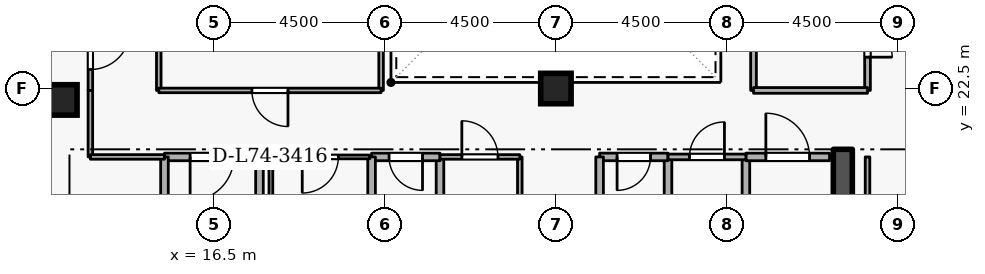
"""IFC4 building model, lengths in metres.
Left out: names, types, materials, properties, quantities, classifications, styles, units other than length and angle.
Written with IfcOpenShell. Run it as: python <this file> out.ifc"""

import sys

from ifc_helpers import new_model, si_unit, direction, frame, frame_2d, origin, origin_2d, place, context, subcontext, project, spatial, rectangle, extrude, element, fill, save


model = new_model("IFC4")
c1 = context("Model", 3, precision=1e-05, world=origin(), true_north=direction((0.0, 1.0)))
c2 = subcontext(c1, "Body", "Model", "MODEL_VIEW")
j1 = project(units=[si_unit("LENGTHUNIT", "METRE"), si_unit("PLANEANGLEUNIT", "RADIAN")], contexts=[c1])
p1 = place(None, origin())
s1 = spatial("IfcSite", under=j1, at=p1, CompositionType="ELEMENT")
p2 = place(p1, origin())
s2 = spatial("IfcBuilding", under=s1, at=p2, CompositionType="ELEMENT")
p3 = place(p2, frame((0.0, 0.0, 276.3)))
s3 = spatial("IfcBuildingStorey", under=s2, at=p3, CompositionType="ELEMENT", Elevation=276.3)
p4 = place(p3, frame((33.05, 15.1, 0.0), z_axis=(0.0, 0.0, 1.0), x_axis=(0.0, 1.0, 0.0)))
e1 = element("IfcWall", 1, at=p4, inside=s3, PredefinedType="SHEAR", context=c2, shape_type="SweptSolid", body=[
    extrude(rectangle(XDim=5.8, YDim=0.5, at=frame_2d((2.9, 0.0))), origin(), (0.0, 0.0, 1.0), 3.6),
])
for number, where, z_axis, x_axis in (
    (2, (12.5, 22.2, 0.0), (0.0, 0.0, 1.0), (1.0, 0.0, 0.0)),
    (3, (25.5, 22.5, 0.0), (0.0, 0.0, 1.0), (1.0, 0.0, 0.0)),
):
    element("IfcColumn", number, at=place(p3, frame(where, z_axis=z_axis, x_axis=x_axis)), inside=s3, PredefinedType="COLUMN", context=c2, shape_type="SweptSolid", body=[
        extrude(rectangle(XDim=0.8, YDim=0.8, at=origin_2d()), origin(), (0.0, 0.0, 1.0), 3.6),
    ])
p5 = place(p3, frame((17.7, 18.4, 0.0), z_axis=(0.0, 0.0, 1.0), x_axis=(0.0, 1.0, 0.0)))
e4 = element("IfcWall", 4, at=p5, inside=s3, PredefinedType="STANDARD", context=c2, shape_type="SweptSolid", body=[
    extrude(rectangle(XDim=2.3, YDim=0.2, at=frame_2d((1.15, 0.0))), origin(), (0.0, 0.0, 1.0), 2.465),
])
p6 = place(p3, frame((17.7, 20.7, 0.0), z_axis=(0.0, 0.0, 1.0), x_axis=(-1.0, 0.0, 0.0)))
e5 = element("IfcWall", 5, at=p6, inside=s3, PredefinedType="STANDARD", context=c2, shape_type="SweptSolid", body=[
    extrude(rectangle(XDim=2.5, YDim=0.2, at=frame_2d((1.25, 0.0))), origin(), (0.0, 0.0, 1.0), 3.26),
])
p7 = place(p6, frame((0.675, 0.0, 0.0)))
e6 = element("IfcOpeningElement", 6, at=p7, cuts=e5, PredefinedType="OPENING", context=c2, shape_type="SweptSolid", body=[
    extrude(rectangle(XDim=1.15, YDim=2.1, at=frame_2d((0.575, 1.05))), frame((0.0, 0.11, 0.0), z_axis=(0.0, -1.0, 0.0), x_axis=(1.0, 0.0, 0.0)), (0.0, 0.0, 1.0), 0.22),
])
p8 = place(p3, frame((15.2, 20.7, 0.0), z_axis=(0.0, 0.0, 1.0), x_axis=(0.0, -1.0, 0.0)))
e7 = element("IfcWall", 7, at=p8, inside=s3, PredefinedType="STANDARD", context=c2, shape_type="SweptSolid", body=[
    extrude(rectangle(XDim=5.7, YDim=0.2, at=frame_2d((2.85, 0.0))), origin(), (0.0, 0.0, 1.0), 3.26),
])
p9 = place(p3, frame((28.45, 18.65, 0.0), z_axis=(0.0, 0.0, 1.0), x_axis=(0.0, 1.0, 0.0)))
e8 = element("IfcWall", 8, at=p9, inside=s3, PredefinedType="STANDARD", context=c2, shape_type="SweptSolid", body=[
    extrude(rectangle(XDim=2.05, YDim=0.2, at=frame_2d((1.025, 0.0))), origin(), (0.0, 0.0, 1.0), 3.26),
])
p10 = place(p3, frame((28.45, 20.7, 0.0), z_axis=(0.0, 0.0, 1.0), x_axis=(-1.0, 0.0, 0.0)))
e9 = element("IfcWall", 9, at=p10, inside=s3, PredefinedType="STANDARD", context=c2, shape_type="SweptSolid", body=[
    extrude(rectangle(XDim=1.8, YDim=0.2, at=frame_2d((0.9, 0.0))), origin(), (0.0, 0.0, 1.0), 3.26),
])
p11 = place(p10, frame((0.46, 0.0, 0.0)))
e10 = element("IfcOpeningElement", 10, at=p11, cuts=e9, PredefinedType="OPENING", context=c2, shape_type="SweptSolid", body=[
    extrude(rectangle(XDim=0.88, YDim=2.04, at=frame_2d((0.44, 1.02))), frame((0.0, 0.11, 0.0), z_axis=(0.0, -1.0, 0.0), x_axis=(1.0, 0.0, 0.0)), (0.0, 0.0, 1.0), 0.22),
])
for number, where, z_axis, x_axis in (
    (11, (26.65, 20.7, 0.0), (0.0, 0.0, 1.0), (0.0, -1.0, 0.0)),
    (12, (22.45, 18.65, 0.0), (0.0, 0.0, 1.0), (0.0, 1.0, 0.0)),
):
    element("IfcWall", number, at=place(p3, frame(where, z_axis=z_axis, x_axis=x_axis)), inside=s3, PredefinedType="STANDARD", context=c2, shape_type="SweptSolid", body=[
        extrude(rectangle(XDim=2.05, YDim=0.2, at=frame_2d((1.025, 0.0))), origin(), (0.0, 0.0, 1.0), 3.26),
    ])
p12 = place(p3, frame((22.45, 20.7, 0.0), z_axis=(0.0, 0.0, 1.0), x_axis=(-1.0, 0.0, 0.0)))
e13 = element("IfcWall", 13, at=p12, inside=s3, PredefinedType="STANDARD", context=c2, shape_type="SweptSolid", body=[
    extrude(rectangle(XDim=1.8, YDim=0.2, at=frame_2d((0.9, 0.0))), origin(), (0.0, 0.0, 1.0), 3.26),
])
p13 = place(p12, frame((0.46, 0.0, 0.0)))
e14 = element("IfcOpeningElement", 14, at=p13, cuts=e13, PredefinedType="OPENING", context=c2, shape_type="SweptSolid", body=[
    extrude(rectangle(XDim=0.88, YDim=2.04, at=frame_2d((0.44, 1.02))), frame((0.0, 0.11, 0.0), z_axis=(0.0, -1.0, 0.0), x_axis=(1.0, 0.0, 0.0)), (0.0, 0.0, 1.0), 0.22),
])
for number, where, z_axis, x_axis in (
    (15, (20.65, 20.7, 0.0), (0.0, 0.0, 1.0), (0.0, -1.0, 0.0)),
    (16, (30.5, 18.65, 0.0), (0.0, 0.0, 1.0), (0.0, 1.0, 0.0)),
):
    element("IfcWall", number, at=place(p3, frame(where, z_axis=z_axis, x_axis=x_axis)), inside=s3, PredefinedType="STANDARD", context=c2, shape_type="SweptSolid", body=[
        extrude(rectangle(XDim=2.05, YDim=0.2, at=frame_2d((1.025, 0.0))), origin(), (0.0, 0.0, 1.0), 3.26),
    ])
p14 = place(p3, frame((30.5, 20.7, 0.0), z_axis=(0.0, 0.0, 1.0), x_axis=(1.0, 0.0, 0.0)))
e17 = element("IfcWall", 17, at=p14, inside=s3, PredefinedType="STANDARD", context=c2, shape_type="SweptSolid", body=[
    extrude(rectangle(XDim=2.2, YDim=0.2, at=frame_2d((1.1, 0.0))), origin(), (0.0, 0.0, 1.0), 3.26),
])
p15 = place(p14, frame((0.525, 0.0, 0.0)))
e18 = element("IfcOpeningElement", 18, at=p15, cuts=e17, PredefinedType="OPENING", context=c2, shape_type="SweptSolid", body=[
    extrude(rectangle(XDim=1.15, YDim=2.1, at=frame_2d((0.575, 1.05))), frame((0.0, 0.11, 0.0), z_axis=(0.0, -1.0, 0.0), x_axis=(1.0, 0.0, 0.0)), (0.0, 0.0, 1.0), 0.22),
])
p16 = place(p3, frame((20.6, 20.7, 0.0), z_axis=(0.0, 0.0, 1.0), x_axis=(-1.0, 0.0, 0.0)))
e19 = element("IfcWall", 19, at=p16, inside=s3, PredefinedType="PARTITIONING", context=c2, shape_type="SweptSolid", body=[
    extrude(rectangle(XDim=2.6, YDim=0.1, at=frame_2d((1.3, 0.0))), origin(), (0.0, 0.0, 1.0), 3.26),
])
p17 = place(p16, frame((0.825, 0.0, 0.0)))
e20 = element("IfcOpeningElement", 20, at=p17, cuts=e19, PredefinedType="OPENING", context=c2, shape_type="SweptSolid", body=[
    extrude(rectangle(XDim=0.95, YDim=2.1, at=frame_2d((0.475, 1.05))), frame((0.0, 0.06, 0.0), z_axis=(0.0, -1.0, 0.0), x_axis=(1.0, 0.0, 0.0)), (0.0, 0.0, 1.0), 0.12),
])
p18 = place(p3, frame((18.0, 20.7, 0.0), z_axis=(0.0, 0.0, 1.0), x_axis=(0.0, -1.0, 0.0)))
e21 = element("IfcWall", 21, at=p18, inside=s3, PredefinedType="PARTITIONING", context=c2, shape_type="SweptSolid", body=[
    extrude(rectangle(XDim=2.05, YDim=0.1, at=frame_2d((1.025, 0.0))), origin(), (0.0, 0.0, 1.0), 2.465),
])
p19 = place(p3, frame((24.55, 20.7, 0.0), z_axis=(0.0, 0.0, 1.0), x_axis=(0.0, -1.0, 0.0)))
e22 = element("IfcWall", 22, at=p19, inside=s3, PredefinedType="PARTITIONING", context=c2, shape_type="SweptSolid", body=[
    extrude(rectangle(XDim=2.05, YDim=0.12, at=frame_2d((1.025, 0.0))), origin(), (0.0, 0.0, 1.0), 3.26),
])
p20 = place(p3, frame((22.45, 20.7, 0.0), z_axis=(0.0, 0.0, 1.0), x_axis=(1.0, 0.0, 0.0)))
e23 = element("IfcWall", 23, at=p20, inside=s3, PredefinedType="PARTITIONING", context=c2, shape_type="SweptSolid", body=[
    extrude(rectangle(XDim=2.1, YDim=0.12, at=frame_2d((1.05, 0.0))), origin(), (0.0, 0.0, 1.0), 3.26),
])
p21 = place(p20, frame((0.575, 0.0, 0.0)))
e24 = element("IfcOpeningElement", 24, at=p21, cuts=e23, PredefinedType="OPENING", context=c2, shape_type="SweptSolid", body=[
    extrude(rectangle(XDim=0.95, YDim=2.1, at=frame_2d((0.475, 1.05))), frame((0.0, 0.07, 0.0), z_axis=(0.0, -1.0, 0.0), x_axis=(1.0, 0.0, 0.0)), (0.0, 0.0, 1.0), 0.14),
])
p22 = place(p3, frame((28.45, 20.7, 0.0), z_axis=(0.0, 0.0, 1.0), x_axis=(1.0, 0.0, 0.0)))
e25 = element("IfcWall", 25, at=p22, inside=s3, PredefinedType="PARTITIONING", context=c2, shape_type="SweptSolid", body=[
    extrude(rectangle(XDim=2.05, YDim=0.15, at=frame_2d((1.025, 0.0))), origin(), (0.0, 0.0, 1.0), 3.26),
])
p23 = place(p22, frame((0.565, 0.0, 0.0)))
e26 = element("IfcOpeningElement", 26, at=p23, cuts=e25, PredefinedType="OPENING", context=c2, shape_type="SweptSolid", body=[
    extrude(rectangle(XDim=0.92, YDim=2.08, at=frame_2d((0.46, 1.04))), frame((0.0, 0.085, 0.0), z_axis=(0.0, -1.0, 0.0), x_axis=(1.0, 0.0, 0.0)), (0.0, 0.0, 1.0), 0.17),
])
p24 = place(p3, frame((33.7, 20.7, 0.0), z_axis=(0.0, 0.0, 1.0), x_axis=(0.0, -1.0, 0.0)))
e27 = element("IfcWall", 27, at=p24, inside=s3, PredefinedType="PARTITIONING", context=c2, shape_type="SweptSolid", body=[
    extrude(rectangle(XDim=5.9, YDim=0.12, at=frame_2d((2.95, 0.0))), origin(), (0.0, 0.0, 1.0), 3.26),
])
p25 = place(p3, frame((13.25, 24.6, 0.0), z_axis=(0.0, 0.0, 1.0), x_axis=(0.0, -1.0, 0.0)))
e28 = element("IfcWall", 28, at=p25, inside=s3, PredefinedType="PARTITIONING", context=c2, shape_type="SweptSolid", body=[
    extrude(rectangle(XDim=2.15, YDim=0.12, at=frame_2d((1.075, 0.0))), origin(), (0.0, 0.0, 1.0), 3.26),
])
p26 = place(p25, frame((0.55, 0.0, 0.0)))
e29 = element("IfcOpeningElement", 29, at=p26, cuts=e28, PredefinedType="OPENING", context=c2, shape_type="SweptSolid", body=[
    extrude(rectangle(XDim=1.05, YDim=2.1, at=frame_2d((0.525, 1.05))), frame((0.0, 0.07, 0.0), z_axis=(0.0, -1.0, 0.0), x_axis=(1.0, 0.0, 0.0)), (0.0, 0.0, 1.0), 0.14),
])
p27 = place(p3, frame((13.25, 22.45, 0.0), z_axis=(0.0, 0.0, 1.0), x_axis=(0.0, -1.0, 0.0)))
e30 = element("IfcWall", 30, at=p27, inside=s3, PredefinedType="PARTITIONING", context=c2, shape_type="SweptSolid", body=[
    extrude(rectangle(XDim=1.75, YDim=0.12, at=frame_2d((0.875, 0.0))), origin(), (0.0, 0.0, 1.0), 3.26),
])
p28 = place(p3, frame((13.25, 20.7, 0.0), z_axis=(0.0, 0.0, 1.0), x_axis=(1.0, 0.0, 0.0)))
e31 = element("IfcWall", 31, at=p28, inside=s3, PredefinedType="PARTITIONING", context=c2, shape_type="SweptSolid", body=[
    extrude(rectangle(XDim=1.95, YDim=0.12, at=frame_2d((0.975, 0.0))), origin(), (0.0, 0.0, 1.0), 3.26),
])
for number, where, z_axis, x_axis in (
    (32, (15.05, 22.45, 0.0), (0.0, 0.0, 1.0), (0.0, 1.0, 0.0)),
    (33, (20.9, 26.2, 0.0), (0.0, 0.0, 1.0), (0.0, -1.0, 0.0)),
):
    element("IfcWall", number, at=place(p3, frame(where, z_axis=z_axis, x_axis=x_axis)), inside=s3, PredefinedType="PARTITIONING", context=c2, shape_type="SweptSolid", body=[
        extrude(rectangle(XDim=3.75, YDim=0.12, at=frame_2d((1.875, 0.0))), origin(), (0.0, 0.0, 1.0), 3.26),
    ])
p29 = place(p3, frame((20.9, 22.45, 0.0), z_axis=(0.0, 0.0, 1.0), x_axis=(-1.0, 0.0, 0.0)))
e34 = element("IfcWall", 34, at=p29, inside=s3, PredefinedType="PARTITIONING", context=c2, shape_type="SweptSolid", body=[
    extrude(rectangle(XDim=5.85, YDim=0.12, at=frame_2d((2.925, 0.0))), origin(), (0.0, 0.0, 1.0), 3.26),
])
p30 = place(p29, frame((2.45, 0.0, 0.0)))
e35 = element("IfcOpeningElement", 35, at=p30, cuts=e34, PredefinedType="OPENING", context=c2, shape_type="SweptSolid", body=[
    extrude(rectangle(XDim=0.95, YDim=2.1, at=frame_2d((0.475, 1.05))), frame((0.0, 0.07, 0.0), z_axis=(0.0, -1.0, 0.0), x_axis=(1.0, 0.0, 0.0)), (0.0, 0.0, 1.0), 0.14),
])
p31 = place(p3, frame((30.7, 22.45, 0.0), z_axis=(0.0, 0.0, 1.0), x_axis=(0.0, 1.0, 0.0)))
e36 = element("IfcWall", 36, at=p31, inside=s3, PredefinedType="PARTITIONING", context=c2, shape_type="SweptSolid", body=[
    extrude(rectangle(XDim=3.05, YDim=0.15, at=frame_2d((1.525, 0.0))), origin(), (0.0, 0.0, 1.0), 3.26),
])
p32 = place(p3, frame((33.7, 25.5, 0.0), z_axis=(0.0, 0.0, 1.0), x_axis=(0.0, -1.0, 0.0)))
e37 = element("IfcWall", 37, at=p32, inside=s3, PredefinedType="PARTITIONING", context=c2, shape_type="SweptSolid", body=[
    extrude(rectangle(XDim=3.05, YDim=0.15, at=frame_2d((1.525, 0.0))), origin(), (0.0, 0.0, 1.0), 3.26),
])
p33 = place(p32, frame((0.875, 0.0, 0.0)))
e38 = element("IfcOpeningElement", 38, at=p33, cuts=e37, PredefinedType="OPENING", context=c2, shape_type="SweptSolid", body=[
    extrude(rectangle(XDim=1.3, YDim=2.12, at=frame_2d((0.65, 1.06))), frame((0.0, 0.085, 0.0), z_axis=(0.0, -1.0, 0.0), x_axis=(1.0, 0.0, 0.0)), (0.0, 0.0, 1.0), 0.17),
])
p34 = place(p3, frame((33.7, 22.45, 0.0), z_axis=(0.0, 0.0, 1.0), x_axis=(-1.0, 0.0, 0.0)))
e39 = element("IfcWall", 39, at=p34, inside=s3, PredefinedType="PARTITIONING", context=c2, shape_type="SweptSolid", body=[
    extrude(rectangle(XDim=3.0, YDim=0.15, at=frame_2d((1.5, 0.0))), origin(), (0.0, 0.0, 1.0), 3.26),
])
p35 = place(p7, origin())
e40 = element("IfcDoor", 40, at=p35, inside=s3, OperationType="SINGLE_SWING_RIGHT", PredefinedType="DOOR", context=c2, shape_type="SweptSolid", body=[
    extrude(rectangle(XDim=1.15, YDim=2.1, at=frame_2d((0.575, 1.05))), frame((0.0, 0.025, 0.0), z_axis=(0.0, -1.0, 0.0), x_axis=(1.0, 0.0, 0.0)), (0.0, 0.0, 1.0), 0.05),
])
fill(e6, e40)
p36 = place(p11, origin())
e41 = element("IfcDoor", 41, at=p36, inside=s3, OperationType="SINGLE_SWING_RIGHT", PredefinedType="DOOR", context=c2, shape_type="SweptSolid", body=[
    extrude(rectangle(XDim=0.88, YDim=2.04, at=frame_2d((0.44, 1.02))), frame((0.0, 0.025, 0.0), z_axis=(0.0, -1.0, 0.0), x_axis=(1.0, 0.0, 0.0)), (0.0, 0.0, 1.0), 0.05),
])
fill(e10, e41)
p37 = place(p13, origin())
e42 = element("IfcDoor", 42, at=p37, inside=s3, OperationType="SINGLE_SWING_LEFT", PredefinedType="DOOR", context=c2, shape_type="SweptSolid", body=[
    extrude(rectangle(XDim=0.88, YDim=2.04, at=frame_2d((0.44, 1.02))), frame((0.0, 0.025, 0.0), z_axis=(0.0, -1.0, 0.0), x_axis=(1.0, 0.0, 0.0)), (0.0, 0.0, 1.0), 0.05),
])
fill(e14, e42)
p38 = place(p17, origin())
e43 = element("IfcDoor", 43, at=p38, inside=s3, OperationType="SINGLE_SWING_RIGHT", PredefinedType="DOOR", context=c2, shape_type="SweptSolid", body=[
    extrude(rectangle(XDim=0.95, YDim=2.1, at=frame_2d((0.475, 1.05))), frame((0.0, 0.025, 0.0), z_axis=(0.0, -1.0, 0.0), x_axis=(1.0, 0.0, 0.0)), (0.0, 0.0, 1.0), 0.05),
])
fill(e20, e43)
p39 = place(p21, origin())
e44 = element("IfcDoor", 44, at=p39, inside=s3, OperationType="SINGLE_SWING_LEFT", PredefinedType="DOOR", context=c2, shape_type="SweptSolid", body=[
    extrude(rectangle(XDim=0.95, YDim=2.1, at=frame_2d((0.475, 1.05))), frame((0.0, 0.025, 0.0), z_axis=(0.0, -1.0, 0.0), x_axis=(1.0, 0.0, 0.0)), (0.0, 0.0, 1.0), 0.05),
])
fill(e24, e44)
p40 = place(p23, origin())
e45 = element("IfcDoor", 45, at=p40, inside=s3, OperationType="SINGLE_SWING_RIGHT", PredefinedType="DOOR", context=c2, shape_type="SweptSolid", body=[
    extrude(rectangle(XDim=0.92, YDim=2.08, at=frame_2d((0.46, 1.04))), frame((0.0, 0.025, 0.0), z_axis=(0.0, -1.0, 0.0), x_axis=(1.0, 0.0, 0.0)), (0.0, 0.0, 1.0), 0.05),
])
fill(e26, e45)
p41 = place(p15, origin())
e46 = element("IfcDoor", 46, at=p41, inside=s3, OperationType="SINGLE_SWING_LEFT", PredefinedType="DOOR", context=c2, shape_type="SweptSolid", body=[
    extrude(rectangle(XDim=1.15, YDim=2.1, at=frame_2d((0.575, 1.05))), frame((0.0, 0.025, 0.0), z_axis=(0.0, -1.0, 0.0), x_axis=(1.0, 0.0, 0.0)), (0.0, 0.0, 1.0), 0.05),
])
fill(e18, e46)
p42 = place(p26, origin())
e47 = element("IfcDoor", 47, at=p42, inside=s3, OperationType="SINGLE_SWING_LEFT", PredefinedType="DOOR", context=c2, shape_type="SweptSolid", body=[
    extrude(rectangle(XDim=1.05, YDim=2.1, at=frame_2d((0.525, 1.05))), frame((0.0, 0.025, 0.0), z_axis=(0.0, -1.0, 0.0), x_axis=(1.0, 0.0, 0.0)), (0.0, 0.0, 1.0), 0.05),
])
fill(e29, e47)
p43 = place(p30, origin())
e48 = element("IfcDoor", 48, at=p43, inside=s3, OperationType="SINGLE_SWING_LEFT", PredefinedType="DOOR", context=c2, shape_type="SweptSolid", body=[
    extrude(rectangle(XDim=0.95, YDim=2.1, at=frame_2d((0.475, 1.05))), frame((0.0, 0.025, 0.0), z_axis=(0.0, -1.0, 0.0), x_axis=(1.0, 0.0, 0.0)), (0.0, 0.0, 1.0), 0.05),
])
fill(e35, e48)
p44 = place(p33, origin())
e49 = element("IfcDoor", 49, at=p44, inside=s3, OperationType="DOUBLE_DOOR_SINGLE_SWING", PredefinedType="DOOR", context=c2, shape_type="SweptSolid", body=[
    extrude(rectangle(XDim=1.3, YDim=2.12, at=frame_2d((0.65, 1.06))), frame((0.0, 0.025, 0.0), z_axis=(0.0, -1.0, 0.0), x_axis=(1.0, 0.0, 0.0)), (0.0, 0.0, 1.0), 0.05),
])
fill(e38, e49)
save(model, sys.argv[1])
